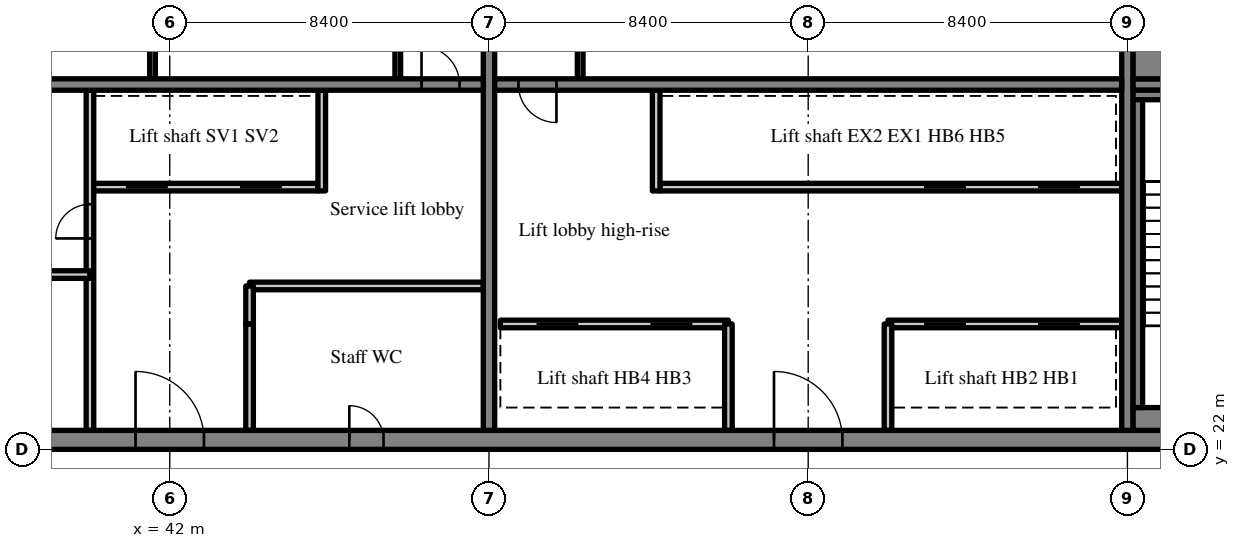
"""IFC4 building model, lengths in metres.
Left out: names, types, materials, properties, quantities, classifications, styles, units other than length and angle.
Written with IfcOpenShell. Run it as: python <this file> out.ifc"""

import sys

from ifc_helpers import new_model, si_unit, direction, frame, frame_2d, origin, place, context, subcontext, project, spatial, rectangle, extrude, source, transform, mapped, element, fill, save


model = new_model("IFC4")
c1 = context("Model", 3, precision=1e-05, world=origin(), true_north=direction((0.0, 1.0)))
c2 = subcontext(c1, "Body", "Model", "MODEL_VIEW")
j1 = project(units=[si_unit("LENGTHUNIT", "METRE"), si_unit("PLANEANGLEUNIT", "RADIAN")], contexts=[c1])
p1 = place(None, origin())
s1 = spatial("IfcSite", under=j1, at=p1, CompositionType="ELEMENT")
p2 = place(p1, origin())
s2 = spatial("IfcBuilding", under=s1, at=p2, CompositionType="ELEMENT")
p3 = place(p2, frame((0.0, 0.0, 309.7)))
s3 = spatial("IfcBuildingStorey", under=s2, at=p3, CompositionType="ELEMENT", Elevation=309.7)
m1 = source(origin(), c2, "Body", "SweptSolid", [
    extrude(rectangle(XDim=50.4, YDim=0.5, at=frame_2d((25.2, 0.0))), origin(), (0.0, 0.0, 1.0), 3.72),
])
p4 = place(p3, frame((25.2, 22.25, 0.0), z_axis=(0.0, 0.0, 1.0), x_axis=(1.0, 0.0, 0.0)))
e1 = element("IfcWall", 1, at=p4, inside=s3, PredefinedType="SHEAR", context=c2, shape_type="MappedRepresentation", body=[
    mapped(m1, transform((0.0, 0.0, 0.0), scale=1.0)),
])
m2 = source(origin(), c2, "Body", "SweptSolid", [
    extrude(rectangle(XDim=1.8, YDim=2.1, at=frame_2d((0.9, 1.05))), frame((0.0, 0.26, 0.0), z_axis=(0.0, -1.0, 0.0), x_axis=(1.0, 0.0, 0.0)), (0.0, 0.0, 1.0), 0.52),
])
p5 = place(p4, frame((15.9, 0.0, 0.0)))
e2 = element("IfcOpeningElement", 2, at=p5, cuts=e1, PredefinedType="OPENING", context=c2, shape_type="MappedRepresentation", body=[
    mapped(m2, transform((0.0, 0.0, 0.0), scale=1.0)),
])
m3 = source(origin(), c2, "Body", "SweptSolid", [
    extrude(rectangle(XDim=0.9, YDim=2.1, at=frame_2d((0.45, 1.05))), frame((0.0, 0.26, 0.0), z_axis=(0.0, -1.0, 0.0), x_axis=(1.0, 0.0, 0.0)), (0.0, 0.0, 1.0), 0.52),
])
p6 = place(p4, frame((11.175, 0.0, 0.0)))
e3 = element("IfcOpeningElement", 3, at=p6, cuts=e1, PredefinedType="OPENING", context=c2, shape_type="MappedRepresentation", body=[
    mapped(m3, transform((0.0, 0.0, 0.0), scale=1.0)),
])
p7 = place(p4, frame((21.525, 0.0, 0.0)))
e4 = element("IfcOpeningElement", 4, at=p7, cuts=e1, PredefinedType="OPENING", context=c2, shape_type="MappedRepresentation", body=[
    mapped(m3, transform((0.0, 0.0, 0.0), scale=1.0)),
])
p8 = place(p4, frame((32.7, 0.0, 0.0)))
e5 = element("IfcOpeningElement", 5, at=p8, cuts=e1, PredefinedType="OPENING", context=c2, shape_type="MappedRepresentation", body=[
    mapped(m2, transform((0.0, 0.0, 0.0), scale=1.0)),
])
m4 = source(origin(), c2, "Body", "SweptSolid", [
    extrude(rectangle(XDim=1.2, YDim=2.1, at=frame_2d((0.6, 1.05))), frame((0.0, 0.26, 0.0), z_axis=(0.0, -1.0, 0.0), x_axis=(1.0, 0.0, 0.0)), (0.0, 0.0, 1.0), 0.52),
])
p9 = place(p4, frame((6.5, 0.0, 0.0)))
e6 = element("IfcOpeningElement", 6, at=p9, cuts=e1, PredefinedType="OPENING", context=c2, shape_type="MappedRepresentation", body=[
    mapped(m4, transform((0.0, 0.0, 0.0), scale=1.0)),
])
p10 = place(p4, frame((47.975, 0.0, 0.0)))
e7 = element("IfcOpeningElement", 7, at=p10, cuts=e1, PredefinedType="OPENING", context=c2, shape_type="MappedRepresentation", body=[
    mapped(m4, transform((0.0, 0.0, 0.0), scale=1.0)),
])
m5 = source(origin(), c2, "Body", "SweptSolid", [
    extrude(rectangle(XDim=19.0, YDim=0.3, at=frame_2d((9.5, 0.0))), origin(), (0.0, 0.0, 1.0), 3.72),
])
p11 = place(p3, frame((50.4, 22.5, 0.0), z_axis=(0.0, 0.0, 1.0), x_axis=(0.0, 1.0, 0.0)))
e8 = element("IfcWall", 8, at=p11, inside=s3, PredefinedType="SHEAR", context=c2, shape_type="MappedRepresentation", body=[
    mapped(m5, transform((0.0, 0.0, 0.0), scale=1.0)),
])
m6 = source(origin(), c2, "Body", "SweptSolid", [
    extrude(rectangle(XDim=1.1, YDim=2.1, at=frame_2d((0.55, 1.05))), frame((0.0, 0.16, 0.0), z_axis=(0.0, -1.0, 0.0), x_axis=(1.0, 0.0, 0.0)), (0.0, 0.0, 1.0), 0.32),
])
p12 = place(p11, frame((12.95, 0.0, 0.0)))
e9 = element("IfcOpeningElement", 9, at=p12, cuts=e8, PredefinedType="OPENING", context=c2, shape_type="MappedRepresentation", body=[
    mapped(m6, transform((0.0, 0.0, 0.0), scale=1.0)),
])
p13 = place(p3, frame((67.2, 22.5, 0.0), z_axis=(0.0, 0.0, 1.0), x_axis=(0.0, 1.0, 0.0)))
e10 = element("IfcWall", 10, at=p13, inside=s3, PredefinedType="SHEAR", context=c2, shape_type="MappedRepresentation", body=[
    mapped(m5, transform((0.0, 0.0, 0.0), scale=1.0)),
])
m7 = source(origin(), c2, "Body", "SweptSolid", [
    extrude(rectangle(XDim=16.5, YDim=0.3, at=frame_2d((8.25, 0.0))), origin(), (0.0, 0.0, 1.0), 3.72),
])
p14 = place(p3, frame((33.75, 31.6, 0.0), z_axis=(0.0, 0.0, 1.0), x_axis=(1.0, 0.0, 0.0)))
e11 = element("IfcWall", 11, at=p14, inside=s3, PredefinedType="SHEAR", context=c2, shape_type="MappedRepresentation", body=[
    mapped(m7, transform((0.0, 0.0, 0.0), scale=1.0)),
])
m8 = source(origin(), c2, "Body", "SweptSolid", [
    extrude(rectangle(XDim=1.0, YDim=2.1, at=frame_2d((0.5, 1.05))), frame((0.0, 0.16, 0.0), z_axis=(0.0, -1.0, 0.0), x_axis=(1.0, 0.0, 0.0)), (0.0, 0.0, 1.0), 0.32),
])
p15 = place(p14, frame((14.875, 0.0, 0.0)))
e12 = element("IfcOpeningElement", 12, at=p15, cuts=e11, PredefinedType="OPENING", context=c2, shape_type="MappedRepresentation", body=[
    mapped(m8, transform((0.0, 0.0, 0.0), scale=1.0)),
])
p16 = place(p3, frame((50.55, 31.6, 0.0), z_axis=(0.0, 0.0, 1.0), x_axis=(1.0, 0.0, 0.0)))
e13 = element("IfcWall", 13, at=p16, inside=s3, PredefinedType="SHEAR", context=c2, shape_type="MappedRepresentation", body=[
    mapped(m7, transform((0.0, 0.0, 0.0), scale=1.0)),
])
p17 = place(p16, frame((0.625, 0.0, 0.0)))
e14 = element("IfcOpeningElement", 14, at=p17, cuts=e13, PredefinedType="OPENING", context=c2, shape_type="MappedRepresentation", body=[
    mapped(m8, transform((0.0, 0.0, 0.0), scale=1.0)),
])
m9 = source(origin(), c2, "Body", "SweptSolid", [
    extrude(rectangle(XDim=7.75, YDim=0.3, at=frame_2d((3.875, 0.0))), origin(), (0.0, 0.0, 1.0), 3.72),
])
p18 = place(p3, frame((67.35, 31.6, 0.0), z_axis=(0.0, 0.0, 1.0), x_axis=(1.0, 0.0, 0.0)))
e15 = element("IfcWall", 15, at=p18, inside=s3, PredefinedType="SHEAR", context=c2, shape_type="MappedRepresentation", body=[
    mapped(m9, transform((0.0, 0.0, 0.0), scale=1.0)),
])
p19 = place(p18, frame((5.875, 0.0, 0.0)))
e16 = element("IfcOpeningElement", 16, at=p19, cuts=e15, PredefinedType="OPENING", context=c2, shape_type="MappedRepresentation", body=[
    mapped(m6, transform((0.0, 0.0, 0.0), scale=1.0)),
])
m10 = source(origin(), c2, "Body", "SweptSolid", [
    extrude(rectangle(XDim=6.0, YDim=0.2, at=frame_2d((3.0, 0.0))), origin(), (0.0, 0.0, 1.0), 3.72),
])
p20 = place(p3, frame((39.9, 28.9, 0.0), z_axis=(0.0, 0.0, 1.0), x_axis=(1.0, 0.0, 0.0)))
e17 = element("IfcWall", 17, at=p20, inside=s3, PredefinedType="SOLIDWALL", context=c2, shape_type="MappedRepresentation", body=[
    mapped(m10, transform((0.0, 0.0, 0.0), scale=1.0)),
])
m11 = source(origin(), c2, "Body", "SweptSolid", [
    extrude(rectangle(XDim=1.1, YDim=2.1, at=frame_2d((0.55, 1.05))), frame((0.0, 0.11, 0.0), z_axis=(0.0, -1.0, 0.0), x_axis=(1.0, 0.0, 0.0)), (0.0, 0.0, 1.0), 0.22),
])
p21 = place(p20, frame((0.95, 0.0, 0.0)))
e18 = element("IfcOpeningElement", 18, at=p21, cuts=e17, PredefinedType="OPENING", context=c2, shape_type="MappedRepresentation", body=[
    mapped(m11, transform((0.0, 0.0, 0.0), scale=1.0)),
])
p22 = place(p20, frame((3.95, 0.0, 0.0)))
e19 = element("IfcOpeningElement", 19, at=p22, cuts=e17, PredefinedType="OPENING", context=c2, shape_type="MappedRepresentation", body=[
    mapped(m11, transform((0.0, 0.0, 0.0), scale=1.0)),
])
m12 = source(origin(), c2, "Body", "SweptSolid", [
    extrude(rectangle(XDim=8.95, YDim=0.2, at=frame_2d((4.475, 0.0))), origin(), (0.0, 0.0, 1.0), 3.72),
])
p23 = place(p3, frame((39.9, 22.5, 0.0), z_axis=(0.0, 0.0, 1.0), x_axis=(0.0, 1.0, 0.0)))
e20 = element("IfcWall", 20, at=p23, inside=s3, PredefinedType="PARTITIONING", context=c2, shape_type="MappedRepresentation", body=[
    mapped(m12, transform((0.0, 0.0, 0.0), scale=1.0)),
])
m13 = source(origin(), c2, "Body", "SweptSolid", [
    extrude(rectangle(XDim=0.9, YDim=2.1, at=frame_2d((0.45, 1.05))), frame((0.0, 0.11, 0.0), z_axis=(0.0, -1.0, 0.0), x_axis=(1.0, 0.0, 0.0)), (0.0, 0.0, 1.0), 0.22),
])
p24 = place(p23, frame((5.05, 0.0, 0.0)))
e21 = element("IfcOpeningElement", 21, at=p24, cuts=e20, PredefinedType="OPENING", context=c2, shape_type="MappedRepresentation", body=[
    mapped(m13, transform((0.0, 0.0, 0.0), scale=1.0)),
])
m14 = source(origin(), c2, "Body", "SweptSolid", [
    extrude(rectangle(XDim=2.8, YDim=0.2, at=frame_2d((1.4, 0.0))), origin(), (0.0, 0.0, 1.0), 3.72),
])
p25 = place(p3, frame((44.1, 22.5, 0.0), z_axis=(0.0, 0.0, 1.0), x_axis=(0.0, 1.0, 0.0)))
e22 = element("IfcWall", 22, at=p25, inside=s3, PredefinedType="PARTITIONING", context=c2, shape_type="MappedRepresentation", body=[
    mapped(m14, transform((0.0, 0.0, 0.0), scale=1.0)),
])
m15 = source(origin(), c2, "Body", "SweptSolid", [
    extrude(rectangle(XDim=2.65, YDim=0.2, at=frame_2d((1.325, 0.0))), origin(), (0.0, 0.0, 1.0), 3.72),
])
p26 = place(p3, frame((46.0, 28.8, 0.0), z_axis=(0.0, 0.0, 1.0), x_axis=(0.0, 1.0, 0.0)))
e23 = element("IfcWall", 23, at=p26, inside=s3, PredefinedType="SOLIDWALL", context=c2, shape_type="MappedRepresentation", body=[
    mapped(m15, transform((0.0, 0.0, 0.0), scale=1.0)),
])
m16 = source(origin(), c2, "Body", "SweptSolid", [
    extrude(rectangle(XDim=6.15, YDim=0.2, at=frame_2d((3.075, 0.0))), origin(), (0.0, 0.0, 1.0), 3.72),
])
for number, where, z_axis, x_axis in (
    (24, (33.75, 26.6, 0.0), (0.0, 0.0, 1.0), (1.0, 0.0, 0.0)),
    (25, (44.1, 26.3, 0.0), (0.0, 0.0, 1.0), (1.0, 0.0, 0.0)),
):
    element("IfcWall", number, at=place(p3, frame(where, z_axis=z_axis, x_axis=x_axis)), inside=s3, PredefinedType="PARTITIONING", context=c2, shape_type="MappedRepresentation", body=[
        mapped(m16, transform((0.0, 0.0, 0.0), scale=1.0)),
    ])
m17 = source(origin(), c2, "Body", "SweptSolid", [
    extrude(rectangle(XDim=1.0, YDim=0.2, at=frame_2d((0.5, 0.0))), origin(), (0.0, 0.0, 1.0), 3.72),
])
p27 = place(p3, frame((44.1, 25.3, 0.0), z_axis=(0.0, 0.0, 1.0), x_axis=(0.0, 1.0, 0.0)))
e26 = element("IfcWall", 26, at=p27, inside=s3, PredefinedType="PARTITIONING", context=c2, shape_type="MappedRepresentation", body=[
    mapped(m17, transform((0.0, 0.0, 0.0), scale=1.0)),
])
m18 = source(origin(), c2, "Body", "SweptSolid", [
    extrude(rectangle(XDim=3.25, YDim=0.15, at=frame_2d((1.625, 0.0))), origin(), (0.0, 0.0, 1.0), 3.72),
])
for number, where, z_axis, x_axis in (
    (27, (48.0, 31.75, 0.0), (0.0, 0.0, 1.0), (0.0, 1.0, 0.0)),
    (28, (41.546, 31.75, 0.0), (0.0, 0.0, 1.0), (0.0, 1.0, 0.0)),
):
    element("IfcWall", number, at=place(p3, frame(where, z_axis=z_axis, x_axis=x_axis)), inside=s3, PredefinedType="PARTITIONING", context=c2, shape_type="MappedRepresentation", body=[
        mapped(m18, transform((0.0, 0.0, 0.0), scale=1.0)),
    ])
m19 = source(origin(), c2, "Body", "SweptSolid", [
    extrude(rectangle(XDim=6.15, YDim=0.2, at=frame_2d((3.075, 0.0))), origin(), (0.0, 0.0, 1.0), 3.72),
])
p28 = place(p3, frame((67.05, 25.3, 0.0), z_axis=(0.0, 0.0, 1.0), x_axis=(-1.0, 0.0, 0.0)))
e29 = element("IfcWall", 29, at=p28, inside=s3, PredefinedType="SOLIDWALL", context=c2, shape_type="MappedRepresentation", body=[
    mapped(m19, transform((0.0, 0.0, 0.0), scale=1.0)),
])
p29 = place(p28, frame((1.1, 0.0, 0.0)))
e30 = element("IfcOpeningElement", 30, at=p29, cuts=e29, PredefinedType="OPENING", context=c2, shape_type="MappedRepresentation", body=[
    mapped(m11, transform((0.0, 0.0, 0.0), scale=1.0)),
])
p30 = place(p28, frame((4.1, 0.0, 0.0)))
e31 = element("IfcOpeningElement", 31, at=p30, cuts=e29, PredefinedType="OPENING", context=c2, shape_type="MappedRepresentation", body=[
    mapped(m11, transform((0.0, 0.0, 0.0), scale=1.0)),
])
p31 = place(p3, frame((56.7, 25.3, 0.0), z_axis=(0.0, 0.0, 1.0), x_axis=(-1.0, 0.0, 0.0)))
e32 = element("IfcWall", 32, at=p31, inside=s3, PredefinedType="SOLIDWALL", context=c2, shape_type="MappedRepresentation", body=[
    mapped(m10, transform((0.0, 0.0, 0.0), scale=1.0)),
])
p32 = place(p31, frame((0.95, 0.0, 0.0)))
e33 = element("IfcOpeningElement", 33, at=p32, cuts=e32, PredefinedType="OPENING", context=c2, shape_type="MappedRepresentation", body=[
    mapped(m11, transform((0.0, 0.0, 0.0), scale=1.0)),
])
p33 = place(p31, frame((3.95, 0.0, 0.0)))
e34 = element("IfcOpeningElement", 34, at=p33, cuts=e32, PredefinedType="OPENING", context=c2, shape_type="MappedRepresentation", body=[
    mapped(m11, transform((0.0, 0.0, 0.0), scale=1.0)),
])
m20 = source(origin(), c2, "Body", "SweptSolid", [
    extrude(rectangle(XDim=12.15, YDim=0.2, at=frame_2d((6.075, 0.0))), origin(), (0.0, 0.0, 1.0), 3.72),
])
p34 = place(p3, frame((67.05, 28.9, 0.0), z_axis=(0.0, 0.0, 1.0), x_axis=(-1.0, 0.0, 0.0)))
e35 = element("IfcWall", 35, at=p34, inside=s3, PredefinedType="SOLIDWALL", context=c2, shape_type="MappedRepresentation", body=[
    mapped(m20, transform((0.0, 0.0, 0.0), scale=1.0)),
])
p35 = place(p34, frame((1.1, 0.0, 0.0)))
e36 = element("IfcOpeningElement", 36, at=p35, cuts=e35, PredefinedType="OPENING", context=c2, shape_type="MappedRepresentation", body=[
    mapped(m11, transform((0.0, 0.0, 0.0), scale=1.0)),
])
p36 = place(p34, frame((4.1, 0.0, 0.0)))
e37 = element("IfcOpeningElement", 37, at=p36, cuts=e35, PredefinedType="OPENING", context=c2, shape_type="MappedRepresentation", body=[
    mapped(m11, transform((0.0, 0.0, 0.0), scale=1.0)),
])
for number, where, z_axis, x_axis in (
    (38, (60.9, 22.5, 0.0), (0.0, 0.0, 1.0), (0.0, 1.0, 0.0)),
    (39, (56.7, 22.5, 0.0), (0.0, 0.0, 1.0), (0.0, 1.0, 0.0)),
):
    element("IfcWall", number, at=place(p3, frame(where, z_axis=z_axis, x_axis=x_axis)), inside=s3, PredefinedType="SOLIDWALL", context=c2, shape_type="MappedRepresentation", body=[
        mapped(m14, transform((0.0, 0.0, 0.0), scale=1.0)),
    ])
p37 = place(p3, frame((54.8, 28.8, 0.0), z_axis=(0.0, 0.0, 1.0), x_axis=(0.0, 1.0, 0.0)))
e40 = element("IfcWall", 40, at=p37, inside=s3, PredefinedType="SOLIDWALL", context=c2, shape_type="MappedRepresentation", body=[
    mapped(m15, transform((0.0, 0.0, 0.0), scale=1.0)),
])
p38 = place(p3, frame((52.8, 31.75, 0.0), z_axis=(0.0, 0.0, 1.0), x_axis=(0.0, 1.0, 0.0)))
e41 = element("IfcWall", 41, at=p38, inside=s3, PredefinedType="PARTITIONING", context=c2, shape_type="MappedRepresentation", body=[
    mapped(m18, transform((0.0, 0.0, 0.0), scale=1.0)),
])
m21 = source(origin(), c2, "Body", "SweptSolid", [
    extrude(rectangle(XDim=4.9, YDim=0.6, at=frame_2d((2.45, 0.0))), origin(), (0.0, 0.0, 1.0), 3.72),
])
p39 = place(p3, frame((67.35, 22.8, 0.0), z_axis=(0.0, 0.0, 1.0), x_axis=(1.0, 0.0, 0.0)))
e42 = element("IfcWall", 42, at=p39, inside=s3, PredefinedType="SOLIDWALL", context=c2, shape_type="MappedRepresentation", body=[
    mapped(m21, transform((0.0, 0.0, 0.0), scale=1.0)),
])
m22 = source(origin(), c2, "Body", "SweptSolid", [
    extrude(rectangle(XDim=4.9, YDim=0.25, at=frame_2d((2.45, 0.0))), origin(), (0.0, 0.0, 1.0), 3.72),
])
p40 = place(p3, frame((67.35, 31.325, 0.0), z_axis=(0.0, 0.0, 1.0), x_axis=(1.0, 0.0, 0.0)))
e43 = element("IfcWall", 43, at=p40, inside=s3, PredefinedType="SOLIDWALL", context=c2, shape_type="MappedRepresentation", body=[
    mapped(m22, transform((0.0, 0.0, 0.0), scale=1.0)),
])
m23 = source(origin(), c2, "Body", "SweptSolid", [
    extrude(rectangle(XDim=8.1, YDim=0.25, at=frame_2d((4.05, 0.0))), origin(), (0.0, 0.0, 1.0), 3.72),
])
p41 = place(p3, frame((67.475, 23.1, 0.0), z_axis=(0.0, 0.0, 1.0), x_axis=(0.0, 1.0, 0.0)))
e44 = element("IfcWall", 44, at=p41, inside=s3, PredefinedType="SOLIDWALL", context=c2, shape_type="MappedRepresentation", body=[
    mapped(m23, transform((0.0, 0.0, 0.0), scale=1.0)),
])
m24 = source(origin(), c2, "Body", "SweptSolid", [
    extrude(rectangle(XDim=4.9, YDim=1.05, at=frame_2d((2.45, 0.0))), origin(), (0.0, 0.0, 1.0), 3.72),
])
p42 = place(p3, frame((67.35, 32.275, 0.0), z_axis=(0.0, 0.0, 1.0), x_axis=(1.0, 0.0, 0.0)))
e45 = element("IfcWall", 45, at=p42, inside=s3, PredefinedType="SOLIDWALL", context=c2, shape_type="MappedRepresentation", body=[
    mapped(m24, transform((0.0, 0.0, 0.0), scale=1.0)),
])
m25 = source(origin(), c2, "Body", "SweptSolid", [
    extrude(rectangle(XDim=1.8, YDim=2.1, at=frame_2d((0.9, 1.05))), frame((0.0, 0.175, 0.0), z_axis=(0.0, -1.0, 0.0), x_axis=(1.0, 0.0, 0.0)), (0.0, 0.0, 1.0), 0.05),
])
p43 = place(p5, origin())
e46 = element("IfcDoor", 46, at=p43, inside=s3, OperationType="DOUBLE_DOOR_SINGLE_SWING", PredefinedType="DOOR", context=c2, shape_type="MappedRepresentation", body=[
    mapped(m25, transform((0.0, 0.0, 0.0), scale=1.0)),
])
fill(e2, e46)
m26 = source(origin(), c2, "Body", "SweptSolid", [
    extrude(rectangle(XDim=1.0, YDim=2.1, at=frame_2d((0.5, 1.05))), frame((0.0, 0.025, 0.0), z_axis=(0.0, -1.0, 0.0), x_axis=(1.0, 0.0, 0.0)), (0.0, 0.0, 1.0), 0.05),
])
p44 = place(p15, origin())
e47 = element("IfcDoor", 47, at=p44, inside=s3, OperationType="SINGLE_SWING_LEFT", PredefinedType="DOOR", context=c2, shape_type="MappedRepresentation", body=[
    mapped(m26, transform((0.0, 0.0, 0.0), scale=1.0)),
])
fill(e12, e47)
m27 = source(origin(), c2, "Body", "SweptSolid", [
    extrude(rectangle(XDim=1.1, YDim=2.1, at=frame_2d((0.55, 1.05))), frame((0.0, 0.025, 0.0), z_axis=(0.0, -1.0, 0.0), x_axis=(1.0, 0.0, 0.0)), (0.0, 0.0, 1.0), 0.05),
])
p45 = place(p21, origin())
e48 = element("IfcDoor", 48, at=p45, inside=s3, OperationType="SLIDING_TO_LEFT", PredefinedType="DOOR", context=c2, shape_type="MappedRepresentation", body=[
    mapped(m27, transform((0.0, 0.0, 0.0), scale=1.0)),
])
fill(e18, e48)
p46 = place(p22, origin())
e49 = element("IfcDoor", 49, at=p46, inside=s3, OperationType="SLIDING_TO_RIGHT", PredefinedType="DOOR", context=c2, shape_type="MappedRepresentation", body=[
    mapped(m27, transform((0.0, 0.0, 0.0), scale=1.0)),
])
fill(e19, e49)
m28 = source(origin(), c2, "Body", "SweptSolid", [
    extrude(rectangle(XDim=0.9, YDim=2.1, at=frame_2d((0.45, 1.05))), frame((0.0, 0.025, 0.0), z_axis=(0.0, -1.0, 0.0), x_axis=(1.0, 0.0, 0.0)), (0.0, 0.0, 1.0), 0.05),
])
p47 = place(p24, origin())
e50 = element("IfcDoor", 50, at=p47, inside=s3, OperationType="SINGLE_SWING_LEFT", PredefinedType="DOOR", context=c2, shape_type="MappedRepresentation", body=[
    mapped(m28, transform((0.0, 0.0, 0.0), scale=1.0)),
])
fill(e21, e50)
m29 = source(origin(), c2, "Body", "SweptSolid", [
    extrude(rectangle(XDim=0.9, YDim=2.1, at=frame_2d((0.45, 1.05))), frame((0.0, 0.175, 0.0), z_axis=(0.0, -1.0, 0.0), x_axis=(1.0, 0.0, 0.0)), (0.0, 0.0, 1.0), 0.05),
])
p48 = place(p7, origin())
e51 = element("IfcDoor", 51, at=p48, inside=s3, OperationType="SINGLE_SWING_LEFT", PredefinedType="DOOR", context=c2, shape_type="MappedRepresentation", body=[
    mapped(m29, transform((0.0, 0.0, 0.0), scale=1.0)),
])
fill(e4, e51)
p49 = place(p8, origin())
e52 = element("IfcDoor", 52, at=p49, inside=s3, OperationType="DOUBLE_DOOR_SINGLE_SWING", PredefinedType="DOOR", context=c2, shape_type="MappedRepresentation", body=[
    mapped(m25, transform((0.0, 0.0, 0.0), scale=1.0)),
])
fill(e5, e52)
p50 = place(p17, origin())
e53 = element("IfcDoor", 53, at=p50, inside=s3, OperationType="SINGLE_SWING_RIGHT", PredefinedType="DOOR", context=c2, shape_type="MappedRepresentation", body=[
    mapped(m26, transform((0.0, 0.0, 0.0), scale=1.0)),
])
fill(e14, e53)
p51 = place(p29, origin())
e54 = element("IfcDoor", 54, at=p51, inside=s3, OperationType="SLIDING_TO_RIGHT", PredefinedType="DOOR", context=c2, shape_type="MappedRepresentation", body=[
    mapped(m27, transform((0.0, 0.0, 0.0), scale=1.0)),
])
fill(e30, e54)
p52 = place(p30, origin())
e55 = element("IfcDoor", 55, at=p52, inside=s3, OperationType="SLIDING_TO_LEFT", PredefinedType="DOOR", context=c2, shape_type="MappedRepresentation", body=[
    mapped(m27, transform((0.0, 0.0, 0.0), scale=1.0)),
])
fill(e31, e55)
p53 = place(p32, origin())
e56 = element("IfcDoor", 56, at=p53, inside=s3, OperationType="SLIDING_TO_RIGHT", PredefinedType="DOOR", context=c2, shape_type="MappedRepresentation", body=[
    mapped(m27, transform((0.0, 0.0, 0.0), scale=1.0)),
])
fill(e33, e56)
p54 = place(p33, origin())
e57 = element("IfcDoor", 57, at=p54, inside=s3, OperationType="SLIDING_TO_LEFT", PredefinedType="DOOR", context=c2, shape_type="MappedRepresentation", body=[
    mapped(m27, transform((0.0, 0.0, 0.0), scale=1.0)),
])
fill(e34, e57)
p55 = place(p35, origin())
e58 = element("IfcDoor", 58, at=p55, inside=s3, OperationType="SLIDING_TO_RIGHT", PredefinedType="DOOR", context=c2, shape_type="MappedRepresentation", body=[
    mapped(m27, transform((0.0, 0.0, 0.0), scale=1.0)),
])
fill(e36, e58)
p56 = place(p36, origin())
e59 = element("IfcDoor", 59, at=p56, inside=s3, OperationType="SLIDING_TO_LEFT", PredefinedType="DOOR", context=c2, shape_type="MappedRepresentation", body=[
    mapped(m27, transform((0.0, 0.0, 0.0), scale=1.0)),
])
fill(e37, e59)
save(model, sys.argv[1])
